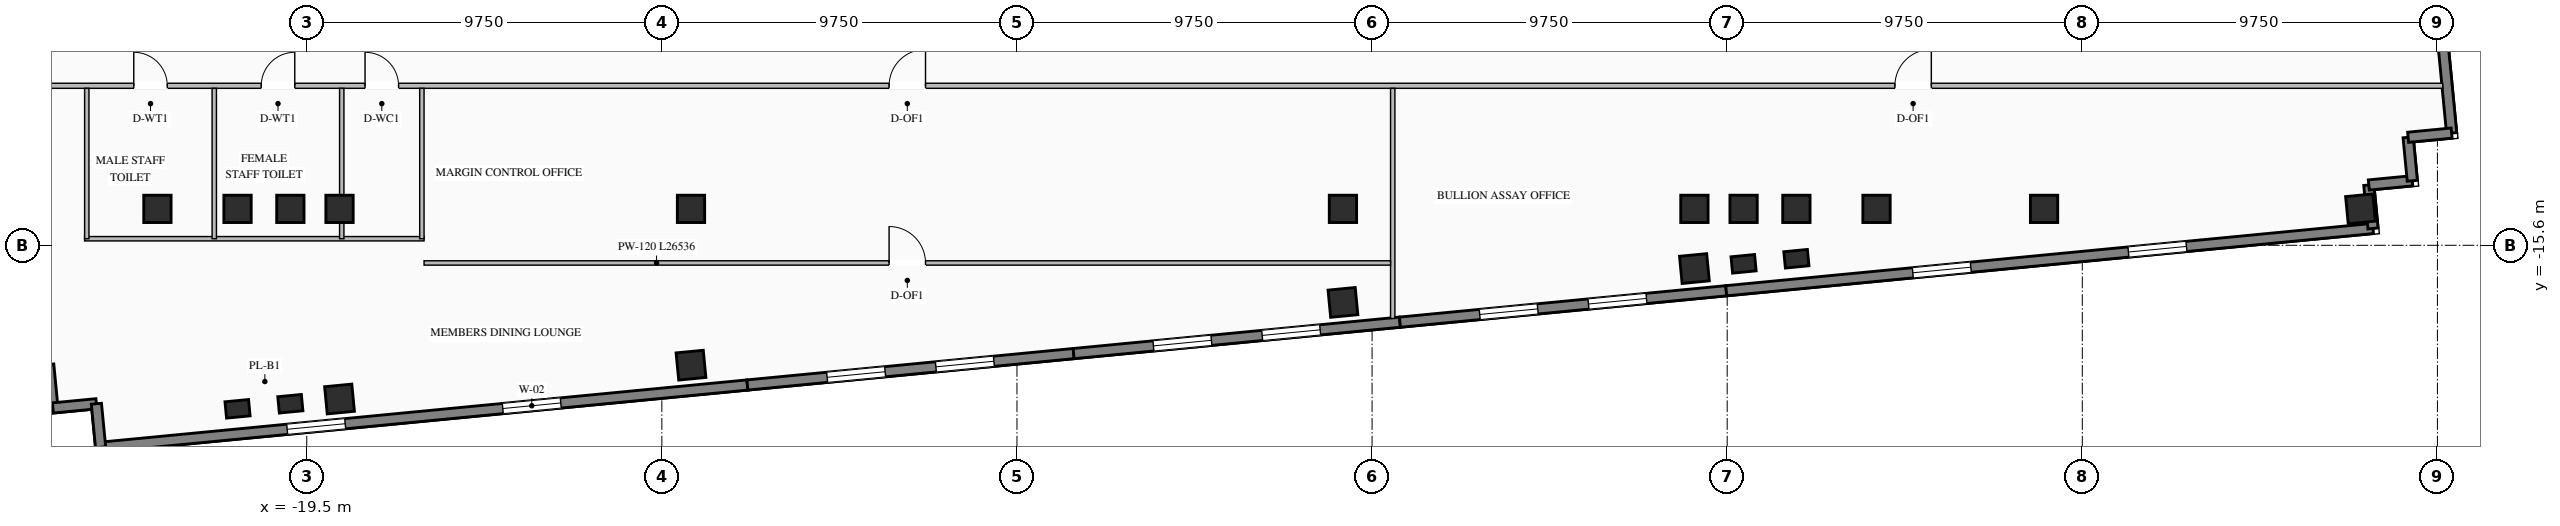
"""IFC4 building model, lengths in metres.
Left out: names, types, materials, properties, quantities, classifications, styles, units other than length and angle.
Written with IfcOpenShell. Run it as: python <this file> out.ifc"""

import sys

from ifc_helpers import new_model, si_unit, direction, frame, frame_2d, origin, origin_2d, place, context, subcontext, project, spatial, rectangle, i_section, extrude, element, fill, save


model = new_model("IFC4")
c1 = context("Model", 3, precision=1e-05, world=origin(), true_north=direction((0.0, 1.0)))
c2 = subcontext(c1, "Body", "Model", "MODEL_VIEW")
j1 = project(units=[si_unit("LENGTHUNIT", "METRE"), si_unit("PLANEANGLEUNIT", "RADIAN")], contexts=[c1])
p1 = place(None, origin())
s1 = spatial("IfcSite", under=j1, at=p1, CompositionType="ELEMENT")
p2 = place(p1, origin())
s2 = spatial("IfcBuilding", under=s1, at=p2, CompositionType="ELEMENT")
p3 = place(p2, frame((0.0, 0.0, 108.7)))
s3 = spatial("IfcBuildingStorey", under=s2, at=p3, CompositionType="ELEMENT", Elevation=108.7)
for number, where, z_axis, x_axis in (
    (1, (-21.4, -14.6, 0.0), (0.0, 0.0, 1.0), (1.0, 0.0, 0.0)),
    (2, (-19.95, -14.6, 0.0), (0.0, 0.0, 1.0), (1.0, 0.0, 0.0)),
    (3, (-18.6, -14.6, 0.0), (0.0, 0.0, 1.0), (1.0, 0.0, 0.0)),
    (4, (-8.95, -14.6, 0.0), (0.0, 0.0, 1.0), (1.0, 0.0, 0.0)),
    (5, (8.95, -14.6, 0.0), (0.0, 0.0, 1.0), (1.0, 0.0, 0.0)),
    (6, (18.6, -14.6, 0.0), (0.0, 0.0, 1.0), (1.0, 0.0, 0.0)),
    (7, (19.95, -14.6, 0.0), (0.0, 0.0, 1.0), (1.0, 0.0, 0.0)),
    (8, (21.4, -14.6, 0.0), (0.0, 0.0, 1.0), (1.0, 0.0, 0.0)),
    (9, (-23.6, -14.6, 0.0), (0.0, 0.0, 1.0), (1.0, 0.0, 0.0)),
    (10, (23.6, -14.6, 0.0), (0.0, 0.0, 1.0), (1.0, 0.0, 0.0)),
    (11, (28.2, -14.6, 0.0), (0.0, 0.0, 1.0), (1.0, 0.0, 0.0)),
    (12, (-18.6, -19.821, 0.0), (0.0, 0.0, 1.0), (0.995, 0.096, 0.0)),
    (13, (-8.95, -18.892, 0.0), (0.0, 0.0, 1.0), (0.995, 0.096, 0.0)),
    (14, (8.95, -17.168, 0.0), (0.0, 0.0, 1.0), (0.995, 0.096, 0.0)),
    (15, (18.6, -16.239, 0.0), (0.0, 0.0, 1.0), (0.995, 0.096, 0.0)),
    (16, (36.888, -14.6, 0.0), (0.0, 0.0, 1.0), (0.995, 0.096, 0.0)),
):
    element("IfcColumn", number, at=place(p3, frame(where, z_axis=z_axis, x_axis=x_axis)), inside=s3, PredefinedType="COLUMN", context=c2, shape_type="SweptSolid", body=[
        extrude(i_section(OverallWidth=0.75, OverallDepth=0.75, WebThickness=0.03, FlangeThickness=0.044, at=origin_2d()), origin(), (0.0, 0.0, 1.0), 3.45),
    ])
for number, where, z_axis, x_axis in (
    (17, (-21.4, -20.091, 0.0), (0.0, 0.0, 1.0), (0.995, 0.096, 0.0)),
    (18, (-19.95, -19.951, 0.0), (0.0, 0.0, 1.0), (0.995, 0.096, 0.0)),
    (19, (19.95, -16.109, 0.0), (0.0, 0.0, 1.0), (0.995, 0.096, 0.0)),
    (20, (21.4, -15.969, 0.0), (0.0, 0.0, 1.0), (0.995, 0.096, 0.0)),
):
    element("IfcColumn", number, at=place(p3, frame(where, z_axis=z_axis, x_axis=x_axis)), inside=s3, PredefinedType="PILASTER", context=c2, shape_type="SweptSolid", body=[
        extrude(rectangle(XDim=0.65, YDim=0.45, at=origin_2d()), origin(), (0.0, 0.0, 1.0), 3.45),
    ])
p4 = place(p3, frame((-7.402, -19.436, 0.0), z_axis=(0.0, 0.0, 1.0), x_axis=(-0.995395780835, -0.095850088663, 0.0)))
e21 = element("IfcWall", 21, at=p4, inside=s3, PredefinedType="STANDARD", context=c2, shape_type="SweptSolid", body=[
    extrude(rectangle(XDim=17.84, YDim=0.28, at=frame_2d((8.92, 0.0))), origin(), (0.0, 0.0, 1.0), 3.15),
])
p5 = place(p4, frame((5.147, 0.0, 0.76)))
e22 = element("IfcOpeningElement", 22, at=p5, cuts=e21, PredefinedType="OPENING", context=c2, shape_type="SweptSolid", body=[
    extrude(rectangle(XDim=1.6, YDim=1.95, at=frame_2d((0.8, 0.975))), frame((0.0, 0.15, 0.0), z_axis=(0.0, -1.0, 0.0), x_axis=(1.0, 0.0, 0.0)), (0.0, 0.0, 1.0), 0.3),
])
p6 = place(p4, frame((11.093, 0.0, 0.76)))
e23 = element("IfcOpeningElement", 23, at=p6, cuts=e21, PredefinedType="OPENING", context=c2, shape_type="SweptSolid", body=[
    extrude(rectangle(XDim=1.6, YDim=1.95, at=frame_2d((0.8, 0.975))), frame((0.0, 0.15, 0.0), z_axis=(0.0, -1.0, 0.0), x_axis=(1.0, 0.0, 0.0)), (0.0, 0.0, 1.0), 0.3),
])
p7 = place(p3, frame((1.556, -18.573, 0.0), z_axis=(0.0, 0.0, 1.0), x_axis=(-0.995396794462, -0.09583956164, 0.0)))
e24 = element("IfcWall", 24, at=p7, inside=s3, PredefinedType="STANDARD", context=c2, shape_type="SweptSolid", body=[
    extrude(rectangle(XDim=9.0, YDim=0.28, at=frame_2d((4.5, 0.0))), origin(), (0.0, 0.0, 1.0), 3.15),
])
p8 = place(p7, frame((2.2, 0.0, 0.76)))
e25 = element("IfcOpeningElement", 25, at=p8, cuts=e24, PredefinedType="OPENING", context=c2, shape_type="SweptSolid", body=[
    extrude(rectangle(XDim=1.6, YDim=1.95, at=frame_2d((0.8, 0.975))), frame((0.0, 0.15, 0.0), z_axis=(0.0, -1.0, 0.0), x_axis=(1.0, 0.0, 0.0)), (0.0, 0.0, 1.0), 0.3),
])
p9 = place(p7, frame((5.2, 0.0, 0.76)))
e26 = element("IfcOpeningElement", 26, at=p9, cuts=e24, PredefinedType="OPENING", context=c2, shape_type="SweptSolid", body=[
    extrude(rectangle(XDim=1.6, YDim=1.95, at=frame_2d((0.8, 0.975))), frame((0.0, 0.15, 0.0), z_axis=(0.0, -1.0, 0.0), x_axis=(1.0, 0.0, 0.0)), (0.0, 0.0, 1.0), 0.3),
])
p10 = place(p3, frame((10.515, -17.711, 0.0), z_axis=(0.0, 0.0, 1.0), x_axis=(-0.995397043619, -0.095836973841, 0.0)))
e27 = element("IfcWall", 27, at=p10, inside=s3, PredefinedType="STANDARD", context=c2, shape_type="SweptSolid", body=[
    extrude(rectangle(XDim=9.0, YDim=0.28, at=frame_2d((4.5, 0.0))), origin(), (0.0, 0.0, 1.0), 3.15),
])
p11 = place(p10, frame((2.2, 0.0, 0.76)))
e28 = element("IfcOpeningElement", 28, at=p11, cuts=e27, PredefinedType="OPENING", context=c2, shape_type="SweptSolid", body=[
    extrude(rectangle(XDim=1.6, YDim=1.95, at=frame_2d((0.8, 0.975))), frame((0.0, 0.15, 0.0), z_axis=(0.0, -1.0, 0.0), x_axis=(1.0, 0.0, 0.0)), (0.0, 0.0, 1.0), 0.3),
])
p12 = place(p10, frame((5.2, 0.0, 0.76)))
e29 = element("IfcOpeningElement", 29, at=p12, cuts=e27, PredefinedType="OPENING", context=c2, shape_type="SweptSolid", body=[
    extrude(rectangle(XDim=1.6, YDim=1.95, at=frame_2d((0.8, 0.975))), frame((0.0, 0.15, 0.0), z_axis=(0.0, -1.0, 0.0), x_axis=(1.0, 0.0, 0.0)), (0.0, 0.0, 1.0), 0.3),
])
p13 = place(p3, frame((19.474, -16.848, 0.0), z_axis=(0.0, 0.0, 1.0), x_axis=(-0.995396794462, -0.09583956164, 0.0)))
e30 = element("IfcWall", 30, at=p13, inside=s3, PredefinedType="STANDARD", context=c2, shape_type="SweptSolid", body=[
    extrude(rectangle(XDim=9.0, YDim=0.28, at=frame_2d((4.5, 0.0))), origin(), (0.0, 0.0, 1.0), 3.15),
])
p14 = place(p13, frame((2.2, 0.0, 0.76)))
e31 = element("IfcOpeningElement", 31, at=p14, cuts=e30, PredefinedType="OPENING", context=c2, shape_type="SweptSolid", body=[
    extrude(rectangle(XDim=1.6, YDim=1.95, at=frame_2d((0.8, 0.975))), frame((0.0, 0.15, 0.0), z_axis=(0.0, -1.0, 0.0), x_axis=(1.0, 0.0, 0.0)), (0.0, 0.0, 1.0), 0.3),
])
p15 = place(p13, frame((5.2, 0.0, 0.76)))
e32 = element("IfcOpeningElement", 32, at=p15, cuts=e30, PredefinedType="OPENING", context=c2, shape_type="SweptSolid", body=[
    extrude(rectangle(XDim=1.6, YDim=1.95, at=frame_2d((0.8, 0.975))), frame((0.0, 0.15, 0.0), z_axis=(0.0, -1.0, 0.0), x_axis=(1.0, 0.0, 0.0)), (0.0, 0.0, 1.0), 0.3),
])
p16 = place(p3, frame((37.231, -15.138, 0.0), z_axis=(0.0, 0.0, 1.0), x_axis=(-0.995395780835, -0.095850088663, 0.0)))
e33 = element("IfcWall", 33, at=p16, inside=s3, PredefinedType="STANDARD", context=c2, shape_type="SweptSolid", body=[
    extrude(rectangle(XDim=17.84, YDim=0.28, at=frame_2d((8.92, 0.0))), origin(), (0.0, 0.0, 1.0), 3.15),
])
p17 = place(p16, frame((5.147, 0.0, 0.76)))
e34 = element("IfcOpeningElement", 34, at=p17, cuts=e33, PredefinedType="OPENING", context=c2, shape_type="SweptSolid", body=[
    extrude(rectangle(XDim=1.6, YDim=1.95, at=frame_2d((0.8, 0.975))), frame((0.0, 0.15, 0.0), z_axis=(0.0, -1.0, 0.0), x_axis=(1.0, 0.0, 0.0)), (0.0, 0.0, 1.0), 0.3),
])
p18 = place(p16, frame((11.093, 0.0, 0.76)))
e35 = element("IfcOpeningElement", 35, at=p18, cuts=e33, PredefinedType="OPENING", context=c2, shape_type="SweptSolid", body=[
    extrude(rectangle(XDim=1.6, YDim=1.95, at=frame_2d((0.8, 0.975))), frame((0.0, 0.15, 0.0), z_axis=(0.0, -1.0, 0.0), x_axis=(1.0, 0.0, 0.0)), (0.0, 0.0, 1.0), 0.3),
])
p19 = place(p3, frame((37.585, 6.234, 0.0), z_axis=(0.0, 0.0, 1.0), x_axis=(0.095841297881, -0.99539662729, 0.0)))
e36 = element("IfcWall", 36, at=p19, inside=s3, PredefinedType="STANDARD", context=c2, shape_type="SweptSolid", body=[
    extrude(rectangle(XDim=18.84, YDim=0.28, at=frame_2d((9.42, 0.0))), origin(), (0.0, 0.0, 1.0), 3.15),
])
p20 = place(p19, frame((5.58, 0.0, 0.76)))
e37 = element("IfcOpeningElement", 37, at=p20, cuts=e36, PredefinedType="OPENING", context=c2, shape_type="SweptSolid", body=[
    extrude(rectangle(XDim=1.4, YDim=1.95, at=frame_2d((0.7, 0.975))), frame((0.0, 0.15, 0.0), z_axis=(0.0, -1.0, 0.0), x_axis=(1.0, 0.0, 0.0)), (0.0, 0.0, 1.0), 0.3),
])
p21 = place(p19, frame((11.86, 0.0, 0.76)))
e38 = element("IfcOpeningElement", 38, at=p21, cuts=e36, PredefinedType="OPENING", context=c2, shape_type="SweptSolid", body=[
    extrude(rectangle(XDim=1.4, YDim=1.95, at=frame_2d((0.7, 0.975))), frame((0.0, 0.15, 0.0), z_axis=(0.0, -1.0, 0.0), x_axis=(1.0, 0.0, 0.0)), (0.0, 0.0, 1.0), 0.3),
])
for number, where, z_axis, x_axis in (
    (39, (37.231, -15.138, 0.0), (0.0, 0.0, 1.0), (-0.096, 0.995, 0.0)),
    (40, (37.116, -13.944, 0.0), (0.0, 0.0, 1.0), (0.995, 0.096, 0.0)),
):
    element("IfcWall", number, at=place(p3, frame(where, z_axis=z_axis, x_axis=x_axis)), inside=s3, PredefinedType="STANDARD", context=c2, shape_type="SweptSolid", body=[
        extrude(rectangle(XDim=1.2, YDim=0.28, at=frame_2d((0.6, 0.0))), origin(), (0.0, 0.0, 1.0), 2.395),
    ])
for number, where, z_axis, x_axis in (
    (41, (38.311, -13.829, 0.0), (0.0, 0.0, 1.0), (-0.096, 0.995, 0.0)),
    (42, (38.196, -12.635, 0.0), (0.0, 0.0, 1.0), (0.995, 0.096, 0.0)),
):
    element("IfcWall", number, at=place(p3, frame(where, z_axis=z_axis, x_axis=x_axis)), inside=s3, PredefinedType="STANDARD", context=c2, shape_type="SweptSolid", body=[
        extrude(rectangle(XDim=1.2, YDim=0.28, at=frame_2d((0.6, 0.0))), origin(), (0.0, 0.0, 1.0), 2.395),
    ])
for number, where, z_axis, x_axis in (
    (43, (-26.584, -18.872, 0.0), (0.0, 0.0, 1.0), (0.096, -0.995, 0.0)),
    (44, (-26.469, -20.067, 0.0), (0.0, 0.0, 1.0), (0.995, 0.096, 0.0)),
):
    element("IfcWall", number, at=place(p3, frame(where, z_axis=z_axis, x_axis=x_axis)), inside=s3, PredefinedType="STANDARD", context=c2, shape_type="SweptSolid", body=[
        extrude(rectangle(XDim=1.2, YDim=0.28, at=frame_2d((0.6, 0.0))), origin(), (0.0, 0.0, 1.0), 3.15),
    ])
p22 = place(p3, frame((-25.275, -19.952, 0.0), z_axis=(0.0, 0.0, 1.0), x_axis=(0.095836473879, -0.995397091755, 0.0)))
e45 = element("IfcWall", 45, at=p22, inside=s3, PredefinedType="STANDARD", context=c2, shape_type="SweptSolid", body=[
    extrude(rectangle(XDim=1.2, YDim=0.28, at=frame_2d((0.6, 0.0))), origin(), (0.0, 0.0, 1.0), 3.15),
])
p23 = place(p3, frame((-28.406, -11.22, 0.0), z_axis=(0.0, 0.0, 1.0), x_axis=(1.0, 0.0, 0.0)))
e46 = element("IfcWall", 46, at=p23, inside=s3, PredefinedType="STANDARD", context=c2, shape_type="SweptSolid", body=[
    extrude(rectangle(XDim=67.551, YDim=0.14, at=frame_2d((33.775, 0.0))), origin(), (0.0, 0.0, 1.0), 2.695),
])
p24 = place(p23, frame((4.157, 0.0, 0.0)))
e47 = element("IfcOpeningElement", 47, at=p24, cuts=e46, PredefinedType="OPENING", context=c2, shape_type="SweptSolid", body=[
    extrude(rectangle(XDim=0.92, YDim=2.08, at=frame_2d((0.46, 1.04))), frame((0.0, 0.08, 0.0), z_axis=(0.0, -1.0, 0.0), x_axis=(1.0, 0.0, 0.0)), (0.0, 0.0, 1.0), 0.16),
])
p25 = place(p23, frame((7.657, 0.0, 0.0)))
e48 = element("IfcOpeningElement", 48, at=p25, cuts=e46, PredefinedType="OPENING", context=c2, shape_type="SweptSolid", body=[
    extrude(rectangle(XDim=0.92, YDim=2.08, at=frame_2d((0.46, 1.04))), frame((0.0, 0.08, 0.0), z_axis=(0.0, -1.0, 0.0), x_axis=(1.0, 0.0, 0.0)), (0.0, 0.0, 1.0), 0.16),
])
p26 = place(p23, frame((10.507, 0.0, 0.0)))
e49 = element("IfcOpeningElement", 49, at=p26, cuts=e46, PredefinedType="OPENING", context=c2, shape_type="SweptSolid", body=[
    extrude(rectangle(XDim=0.92, YDim=2.08, at=frame_2d((0.46, 1.04))), frame((0.0, 0.08, 0.0), z_axis=(0.0, -1.0, 0.0), x_axis=(1.0, 0.0, 0.0)), (0.0, 0.0, 1.0), 0.16),
])
p27 = place(p23, frame((24.895, 0.0, 0.0)))
e50 = element("IfcOpeningElement", 50, at=p27, cuts=e46, PredefinedType="OPENING", context=c2, shape_type="SweptSolid", body=[
    extrude(rectangle(XDim=1.0, YDim=2.08, at=frame_2d((0.5, 1.04))), frame((0.0, 0.08, 0.0), z_axis=(0.0, -1.0, 0.0), x_axis=(1.0, 0.0, 0.0)), (0.0, 0.0, 1.0), 0.16),
])
p28 = place(p23, frame((52.511, 0.0, 0.0)))
e51 = element("IfcOpeningElement", 51, at=p28, cuts=e46, PredefinedType="OPENING", context=c2, shape_type="SweptSolid", body=[
    extrude(rectangle(XDim=1.0, YDim=2.08, at=frame_2d((0.5, 1.04))), frame((0.0, 0.08, 0.0), z_axis=(0.0, -1.0, 0.0), x_axis=(1.0, 0.0, 0.0)), (0.0, 0.0, 1.0), 0.16),
])
p29 = place(p3, frame((-25.599, -15.42, 0.0), z_axis=(0.0, 0.0, 1.0), x_axis=(1.0, 0.0, 0.0)))
e52 = element("IfcWall", 52, at=p29, inside=s3, PredefinedType="STANDARD", context=c2, shape_type="SweptSolid", body=[
    extrude(rectangle(XDim=9.32, YDim=0.12, at=frame_2d((4.66, 0.0))), origin(), (0.0, 0.0, 1.0), 3.15),
])
for number, where, z_axis, x_axis in (
    (53, (-25.539, -15.42, 0.0), (0.0, 0.0, 1.0), (0.0, 1.0, 0.0)),
    (54, (-22.039, -15.42, 0.0), (0.0, 0.0, 1.0), (0.0, 1.0, 0.0)),
):
    element("IfcWall", number, at=place(p3, frame(where, z_axis=z_axis, x_axis=x_axis)), inside=s3, PredefinedType="STANDARD", context=c2, shape_type="SweptSolid", body=[
        extrude(rectangle(XDim=4.13, YDim=0.12, at=frame_2d((2.065, 0.0))), origin(), (0.0, 0.0, 1.0), 3.15),
    ])
p30 = place(p3, frame((-18.539, -15.42, 0.0), z_axis=(0.0, 0.0, 1.0), x_axis=(0.0, 1.0, 0.0)))
e55 = element("IfcWall", 55, at=p30, inside=s3, PredefinedType="STANDARD", context=c2, shape_type="SweptSolid", body=[
    extrude(rectangle(XDim=4.13, YDim=0.12, at=frame_2d((2.065, 0.0))), origin(), (0.0, 0.0, 1.0), 2.545),
])
p31 = place(p3, frame((-16.339, -15.42, 0.0), z_axis=(0.0, 0.0, 1.0), x_axis=(0.0, 1.0, 0.0)))
e56 = element("IfcWall", 56, at=p31, inside=s3, PredefinedType="STANDARD", context=c2, shape_type="SweptSolid", body=[
    extrude(rectangle(XDim=4.13, YDim=0.12, at=frame_2d((2.065, 0.0))), origin(), (0.0, 0.0, 1.0), 3.15),
])
p32 = place(p3, frame((10.317, -17.609, 0.0), z_axis=(0.0, 0.0, 1.0), x_axis=(0.0, 1.0, 0.0)))
e57 = element("IfcWall", 57, at=p32, inside=s3, PredefinedType="STANDARD", context=c2, shape_type="SweptSolid", body=[
    extrude(rectangle(XDim=6.319, YDim=0.12, at=frame_2d((3.16, 0.0))), origin(), (0.0, 0.0, 1.0), 3.15),
])
p33 = place(p3, frame((-16.279, -16.085, 0.0), z_axis=(0.0, 0.0, 1.0), x_axis=(1.0, 0.0, 0.0)))
e58 = element("IfcWall", 58, at=p33, inside=s3, PredefinedType="STANDARD", context=c2, shape_type="SweptSolid", body=[
    extrude(rectangle(XDim=26.536, YDim=0.12, at=frame_2d((13.268, 0.0))), origin(), (0.0, 0.0, 1.0), 3.15),
])
p34 = place(p33, frame((12.768, 0.0, 0.0)))
e59 = element("IfcOpeningElement", 59, at=p34, cuts=e58, PredefinedType="OPENING", context=c2, shape_type="SweptSolid", body=[
    extrude(rectangle(XDim=1.0, YDim=2.08, at=frame_2d((0.5, 1.04))), frame((0.0, 0.07, 0.0), z_axis=(0.0, -1.0, 0.0), x_axis=(1.0, 0.0, 0.0)), (0.0, 0.0, 1.0), 0.14),
])
p35 = place(p5, origin())
e60 = element("IfcWindow", 60, at=p35, inside=s3, PartitioningType="SINGLE_PANEL", PredefinedType="WINDOW", context=c2, shape_type="SweptSolid", body=[
    extrude(rectangle(XDim=1.6, YDim=1.95, at=frame_2d((0.8, 0.975))), frame((0.0, 0.03, 0.0), z_axis=(0.0, -1.0, 0.0), x_axis=(1.0, 0.0, 0.0)), (0.0, 0.0, 1.0), 0.06),
])
fill(e22, e60)
p36 = place(p6, origin())
e61 = element("IfcWindow", 61, at=p36, inside=s3, PartitioningType="SINGLE_PANEL", PredefinedType="WINDOW", context=c2, shape_type="SweptSolid", body=[
    extrude(rectangle(XDim=1.6, YDim=1.95, at=frame_2d((0.8, 0.975))), frame((0.0, 0.03, 0.0), z_axis=(0.0, -1.0, 0.0), x_axis=(1.0, 0.0, 0.0)), (0.0, 0.0, 1.0), 0.06),
])
fill(e23, e61)
p37 = place(p8, origin())
e62 = element("IfcWindow", 62, at=p37, inside=s3, PartitioningType="SINGLE_PANEL", PredefinedType="WINDOW", context=c2, shape_type="SweptSolid", body=[
    extrude(rectangle(XDim=1.6, YDim=1.95, at=frame_2d((0.8, 0.975))), frame((0.0, 0.03, 0.0), z_axis=(0.0, -1.0, 0.0), x_axis=(1.0, 0.0, 0.0)), (0.0, 0.0, 1.0), 0.06),
])
fill(e25, e62)
p38 = place(p9, origin())
e63 = element("IfcWindow", 63, at=p38, inside=s3, PartitioningType="SINGLE_PANEL", PredefinedType="WINDOW", context=c2, shape_type="SweptSolid", body=[
    extrude(rectangle(XDim=1.6, YDim=1.95, at=frame_2d((0.8, 0.975))), frame((0.0, 0.03, 0.0), z_axis=(0.0, -1.0, 0.0), x_axis=(1.0, 0.0, 0.0)), (0.0, 0.0, 1.0), 0.06),
])
fill(e26, e63)
p39 = place(p11, origin())
e64 = element("IfcWindow", 64, at=p39, inside=s3, PartitioningType="SINGLE_PANEL", PredefinedType="WINDOW", context=c2, shape_type="SweptSolid", body=[
    extrude(rectangle(XDim=1.6, YDim=1.95, at=frame_2d((0.8, 0.975))), frame((0.0, 0.03, 0.0), z_axis=(0.0, -1.0, 0.0), x_axis=(1.0, 0.0, 0.0)), (0.0, 0.0, 1.0), 0.06),
])
fill(e28, e64)
p40 = place(p12, origin())
e65 = element("IfcWindow", 65, at=p40, inside=s3, PartitioningType="SINGLE_PANEL", PredefinedType="WINDOW", context=c2, shape_type="SweptSolid", body=[
    extrude(rectangle(XDim=1.6, YDim=1.95, at=frame_2d((0.8, 0.975))), frame((0.0, 0.03, 0.0), z_axis=(0.0, -1.0, 0.0), x_axis=(1.0, 0.0, 0.0)), (0.0, 0.0, 1.0), 0.06),
])
fill(e29, e65)
p41 = place(p14, origin())
e66 = element("IfcWindow", 66, at=p41, inside=s3, PartitioningType="SINGLE_PANEL", PredefinedType="WINDOW", context=c2, shape_type="SweptSolid", body=[
    extrude(rectangle(XDim=1.6, YDim=1.95, at=frame_2d((0.8, 0.975))), frame((0.0, 0.03, 0.0), z_axis=(0.0, -1.0, 0.0), x_axis=(1.0, 0.0, 0.0)), (0.0, 0.0, 1.0), 0.06),
])
fill(e31, e66)
p42 = place(p15, origin())
e67 = element("IfcWindow", 67, at=p42, inside=s3, PartitioningType="SINGLE_PANEL", PredefinedType="WINDOW", context=c2, shape_type="SweptSolid", body=[
    extrude(rectangle(XDim=1.6, YDim=1.95, at=frame_2d((0.8, 0.975))), frame((0.0, 0.03, 0.0), z_axis=(0.0, -1.0, 0.0), x_axis=(1.0, 0.0, 0.0)), (0.0, 0.0, 1.0), 0.06),
])
fill(e32, e67)
p43 = place(p17, origin())
e68 = element("IfcWindow", 68, at=p43, inside=s3, PartitioningType="SINGLE_PANEL", PredefinedType="WINDOW", context=c2, shape_type="SweptSolid", body=[
    extrude(rectangle(XDim=1.6, YDim=1.95, at=frame_2d((0.8, 0.975))), frame((0.0, 0.03, 0.0), z_axis=(0.0, -1.0, 0.0), x_axis=(1.0, 0.0, 0.0)), (0.0, 0.0, 1.0), 0.06),
])
fill(e34, e68)
p44 = place(p18, origin())
e69 = element("IfcWindow", 69, at=p44, inside=s3, PartitioningType="SINGLE_PANEL", PredefinedType="WINDOW", context=c2, shape_type="SweptSolid", body=[
    extrude(rectangle(XDim=1.6, YDim=1.95, at=frame_2d((0.8, 0.975))), frame((0.0, 0.03, 0.0), z_axis=(0.0, -1.0, 0.0), x_axis=(1.0, 0.0, 0.0)), (0.0, 0.0, 1.0), 0.06),
])
fill(e35, e69)
p45 = place(p24, origin())
e70 = element("IfcDoor", 70, at=p45, inside=s3, OperationType="SINGLE_SWING_LEFT", PredefinedType="DOOR", context=c2, shape_type="SweptSolid", body=[
    extrude(rectangle(XDim=0.92, YDim=2.08, at=frame_2d((0.46, 1.04))), frame((0.0, 0.025, 0.0), z_axis=(0.0, -1.0, 0.0), x_axis=(1.0, 0.0, 0.0)), (0.0, 0.0, 1.0), 0.05),
])
fill(e47, e70)
p46 = place(p25, origin())
e71 = element("IfcDoor", 71, at=p46, inside=s3, OperationType="SINGLE_SWING_RIGHT", PredefinedType="DOOR", context=c2, shape_type="SweptSolid", body=[
    extrude(rectangle(XDim=0.92, YDim=2.08, at=frame_2d((0.46, 1.04))), frame((0.0, 0.025, 0.0), z_axis=(0.0, -1.0, 0.0), x_axis=(1.0, 0.0, 0.0)), (0.0, 0.0, 1.0), 0.05),
])
fill(e48, e71)
p47 = place(p26, origin())
e72 = element("IfcDoor", 72, at=p47, inside=s3, OperationType="SINGLE_SWING_LEFT", PredefinedType="DOOR", context=c2, shape_type="SweptSolid", body=[
    extrude(rectangle(XDim=0.92, YDim=2.08, at=frame_2d((0.46, 1.04))), frame((0.0, 0.025, 0.0), z_axis=(0.0, -1.0, 0.0), x_axis=(1.0, 0.0, 0.0)), (0.0, 0.0, 1.0), 0.05),
])
fill(e49, e72)
p48 = place(p27, origin())
e73 = element("IfcDoor", 73, at=p48, inside=s3, OperationType="SINGLE_SWING_RIGHT", PredefinedType="DOOR", context=c2, shape_type="SweptSolid", body=[
    extrude(rectangle(XDim=1.0, YDim=2.08, at=frame_2d((0.5, 1.04))), frame((0.0, 0.025, 0.0), z_axis=(0.0, -1.0, 0.0), x_axis=(1.0, 0.0, 0.0)), (0.0, 0.0, 1.0), 0.05),
])
fill(e50, e73)
p49 = place(p34, origin())
e74 = element("IfcDoor", 74, at=p49, inside=s3, OperationType="SINGLE_SWING_LEFT", PredefinedType="DOOR", context=c2, shape_type="SweptSolid", body=[
    extrude(rectangle(XDim=1.0, YDim=2.08, at=frame_2d((0.5, 1.04))), frame((0.0, 0.025, 0.0), z_axis=(0.0, -1.0, 0.0), x_axis=(1.0, 0.0, 0.0)), (0.0, 0.0, 1.0), 0.05),
])
fill(e59, e74)
p50 = place(p28, origin())
e75 = element("IfcDoor", 75, at=p50, inside=s3, OperationType="SINGLE_SWING_RIGHT", PredefinedType="DOOR", context=c2, shape_type="SweptSolid", body=[
    extrude(rectangle(XDim=1.0, YDim=2.08, at=frame_2d((0.5, 1.04))), frame((0.0, 0.025, 0.0), z_axis=(0.0, -1.0, 0.0), x_axis=(1.0, 0.0, 0.0)), (0.0, 0.0, 1.0), 0.05),
])
fill(e51, e75)
save(model, sys.argv[1])
